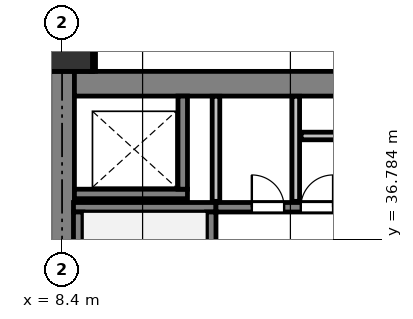
"""IFC4 building model, lengths in metres.
Left out: names, types, materials, properties, quantities, classifications, styles, units other than length and angle.
Written with IfcOpenShell. Run it as: python <this file> out.ifc"""

import sys

from ifc_helpers import new_model, si_unit, direction, frame, frame_2d, origin, origin_2d, place, context, subcontext, project, spatial, rectangle, extrude, element, fill, save


model = new_model("IFC4")
c1 = context("Model", 3, precision=1e-05, world=origin(), true_north=direction((0.0, 1.0)))
c2 = subcontext(c1, "Body", "Model", "MODEL_VIEW")
j1 = project(units=[si_unit("LENGTHUNIT", "METRE"), si_unit("PLANEANGLEUNIT", "RADIAN")], contexts=[c1])
p1 = place(None, origin())
s1 = spatial("IfcSite", under=j1, at=p1, CompositionType="ELEMENT")
p2 = place(p1, origin())
s2 = spatial("IfcBuilding", under=s1, at=p2, CompositionType="ELEMENT")
p3 = place(p2, frame((0.0, 0.0, 15.0)))
s3 = spatial("IfcBuildingStorey", under=s2, at=p3, CompositionType="ELEMENT", Elevation=15.0)
p4 = place(p3, frame((8.4, 42.0, 0.0), z_axis=(0.0, 0.0, 1.0), x_axis=(1.0, 0.0, 0.0)))
e1 = element("IfcColumn", 1, at=p4, inside=s3, PredefinedType="COLUMN", context=c2, shape_type="SweptSolid", body=[
    extrude(rectangle(XDim=1.6, YDim=1.6, at=origin_2d()), origin(), (0.0, 0.0, 1.0), 4.8),
])
p5 = place(p3, frame((8.4, 34.4, 0.0), z_axis=(0.0, 0.0, 1.0), x_axis=(0.0, 1.0, 0.0)))
e2 = element("IfcWall", 2, at=p5, inside=s3, PredefinedType="SHEAR", context=c2, shape_type="SweptSolid", body=[
    extrude(rectangle(XDim=6.8, YDim=0.65, at=frame_2d((3.4, 0.0))), origin(), (0.0, 0.0, 1.0), 4.45),
])
p6 = place(p3, frame((8.725, 40.875, 0.0), z_axis=(0.0, 0.0, 1.0), x_axis=(1.0, 0.0, 0.0)))
e3 = element("IfcWall", 3, at=p6, inside=s3, PredefinedType="SHEAR", context=c2, shape_type="SweptSolid", body=[
    extrude(rectangle(XDim=7.75, YDim=0.65, at=frame_2d((3.875, 0.0))), origin(), (0.0, 0.0, 1.0), 4.45),
])
p7 = place(p3, frame((12.45, 37.625, 0.0), z_axis=(0.0, 0.0, 1.0), x_axis=(-1.0, 0.0, 0.0)))
e4 = element("IfcWall", 4, at=p7, inside=s3, PredefinedType="SHEAR", context=c2, shape_type="SweptSolid", body=[
    extrude(rectangle(XDim=3.75, YDim=0.25, at=frame_2d((1.875, 0.0))), origin(), (0.0, 0.0, 1.0), 4.45),
])
p8 = place(p3, frame((12.325, 29.75, 0.0), z_axis=(0.0, 0.0, 1.0), x_axis=(0.0, 1.0, 0.0)))
e5 = element("IfcWall", 5, at=p8, inside=s3, PredefinedType="SHEAR", context=c2, shape_type="SweptSolid", body=[
    extrude(rectangle(XDim=7.75, YDim=0.25, at=frame_2d((3.875, 0.0))), origin(), (0.0, 0.0, 1.0), 4.45),
])
p9 = place(p8, frame((0.22, 0.0, 0.0)))
e6 = element("IfcOpeningElement", 6, at=p9, cuts=e5, PredefinedType="OPENING", context=c2, shape_type="SweptSolid", body=[
    extrude(rectangle(XDim=1.1, YDim=2.15, at=frame_2d((0.55, 1.075))), frame((0.0, 0.135, 0.0), z_axis=(0.0, -1.0, 0.0), x_axis=(1.0, 0.0, 0.0)), (0.0, 0.0, 1.0), 0.27),
])
p10 = place(p3, frame((8.825, 29.75, 0.0), z_axis=(0.0, 0.0, 1.0), x_axis=(0.0, 1.0, 0.0)))
e7 = element("IfcWall", 7, at=p10, inside=s3, PredefinedType="SHEAR", context=c2, shape_type="SweptSolid", body=[
    extrude(rectangle(XDim=7.75, YDim=0.25, at=frame_2d((3.875, 0.0))), origin(), (0.0, 0.0, 1.0), 4.45),
])
p11 = place(p3, frame((8.725, 37.975, 0.0), z_axis=(0.0, 0.0, 1.0), x_axis=(1.0, 0.0, 0.0)))
e8 = element("IfcWall", 8, at=p11, inside=s3, PredefinedType="SHEAR", context=c2, shape_type="SweptSolid", body=[
    extrude(rectangle(XDim=2.975, YDim=0.25, at=frame_2d((1.487, 0.0))), origin(), (0.0, 0.0, 1.0), 4.45),
])
p12 = place(p3, frame((11.575, 38.1, 0.0), z_axis=(0.0, 0.0, 1.0), x_axis=(0.0, 1.0, 0.0)))
e9 = element("IfcWall", 9, at=p12, inside=s3, PredefinedType="SHEAR", context=c2, shape_type="SweptSolid", body=[
    extrude(rectangle(XDim=2.45, YDim=0.25, at=frame_2d((1.225, 0.0))), origin(), (0.0, 0.0, 1.0), 4.45),
])
p13 = place(p3, frame((12.45, 37.625, 0.0), z_axis=(0.0, 0.0, 1.0), x_axis=(1.0, 0.0, 0.0)))
e10 = element("IfcWall", 10, at=p13, inside=s3, PredefinedType="SHEAR", context=c2, shape_type="SweptSolid", body=[
    extrude(rectangle(XDim=4.025, YDim=0.25, at=frame_2d((2.013, 0.0))), origin(), (0.0, 0.0, 1.0), 4.45),
])
p14 = place(p13, frame((0.944, 0.0, 0.0)))
e11 = element("IfcOpeningElement", 11, at=p14, cuts=e10, PredefinedType="OPENING", context=c2, shape_type="SweptSolid", body=[
    extrude(rectangle(XDim=0.85, YDim=2.15, at=frame_2d((0.425, 1.075))), frame((0.0, 0.135, 0.0), z_axis=(0.0, -1.0, 0.0), x_axis=(1.0, 0.0, 0.0)), (0.0, 0.0, 1.0), 0.27),
])
p15 = place(p13, frame((2.231, 0.0, 0.0)))
e12 = element("IfcOpeningElement", 12, at=p15, cuts=e10, PredefinedType="OPENING", context=c2, shape_type="SweptSolid", body=[
    extrude(rectangle(XDim=0.85, YDim=2.15, at=frame_2d((0.425, 1.075))), frame((0.0, 0.135, 0.0), z_axis=(0.0, -1.0, 0.0), x_axis=(1.0, 0.0, 0.0)), (0.0, 0.0, 1.0), 0.27),
])
for number, where, z_axis, x_axis in (
    (13, (14.55, 37.78, 0.0), (0.0, 0.0, 1.0), (0.0, 1.0, 0.0)),
    (14, (12.45, 40.546, 0.0), (0.0, 0.0, 1.0), (0.0, -1.0, 0.0)),
):
    element("IfcWall", number, at=place(p3, frame(where, z_axis=z_axis, x_axis=x_axis)), inside=s3, PredefinedType="PARTITIONING", context=c2, shape_type="SweptSolid", body=[
        extrude(rectangle(XDim=2.766, YDim=0.2, at=frame_2d((1.383, 0.0))), origin(), (0.0, 0.0, 1.0), 3.35),
    ])
p16 = place(p3, frame((16.196, 39.5, 0.0), z_axis=(0.0, 0.0, 1.0), x_axis=(-1.0, 0.0, 0.0)))
e15 = element("IfcWall", 15, at=p16, inside=s3, PredefinedType="PARTITIONING", context=c2, shape_type="SweptSolid", body=[
    extrude(rectangle(XDim=1.506, YDim=0.2, at=frame_2d((0.753, 0.0))), origin(), (0.0, 0.0, 1.0), 3.35),
])
p17 = place(p3, frame((9.22, 42.8, 0.0), z_axis=(0.0, 0.0, 1.0), x_axis=(0.0, -1.0, 0.0)))
e16 = element("IfcWall", 16, at=p17, inside=s3, PredefinedType="PARTITIONING", context=c2, shape_type="SweptSolid", body=[
    extrude(rectangle(XDim=1.596, YDim=0.12, at=frame_2d((0.798, 0.0))), origin(), (0.0, 0.0, 1.0), 3.05),
])
p18 = place(p14, origin())
e17 = element("IfcDoor", 17, at=p18, inside=s3, OperationType="SINGLE_SWING_LEFT", PredefinedType="DOOR", context=c2, shape_type="SweptSolid", body=[
    extrude(rectangle(XDim=0.85, YDim=2.15, at=frame_2d((0.425, 1.075))), frame((0.0, 0.025, 0.0), z_axis=(0.0, -1.0, 0.0), x_axis=(1.0, 0.0, 0.0)), (0.0, 0.0, 1.0), 0.05),
])
fill(e11, e17)
p19 = place(p15, origin())
e18 = element("IfcDoor", 18, at=p19, inside=s3, OperationType="SINGLE_SWING_RIGHT", PredefinedType="DOOR", context=c2, shape_type="SweptSolid", body=[
    extrude(rectangle(XDim=0.85, YDim=2.15, at=frame_2d((0.425, 1.075))), frame((0.0, 0.025, 0.0), z_axis=(0.0, -1.0, 0.0), x_axis=(1.0, 0.0, 0.0)), (0.0, 0.0, 1.0), 0.05),
])
fill(e12, e18)
save(model, sys.argv[1])
